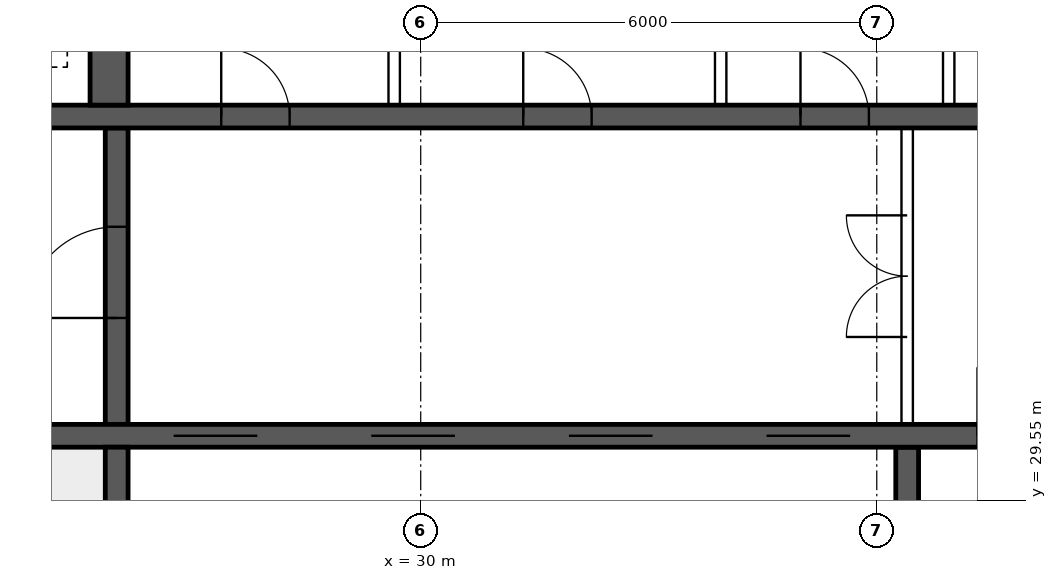
"""IFC4 building model, lengths in metres.
Left out: names, types, materials, properties, quantities, classifications, styles, units other than length and angle.
Written with IfcOpenShell. Run it as: python <this file> out.ifc"""

import sys

from ifc_helpers import new_model, si_unit, direction, frame, frame_2d, origin, place, context, subcontext, project, spatial, rectangle, extrude, element, fill, save


model = new_model("IFC4")
c1 = context("Model", 3, precision=1e-05, world=origin(), true_north=direction((0.0, 1.0)))
c2 = subcontext(c1, "Body", "Model", "MODEL_VIEW")
j1 = project(units=[si_unit("LENGTHUNIT", "METRE"), si_unit("PLANEANGLEUNIT", "RADIAN")], contexts=[c1])
p1 = place(None, origin())
s1 = spatial("IfcSite", under=j1, at=p1, CompositionType="ELEMENT")
p2 = place(p1, origin())
s2 = spatial("IfcBuilding", under=s1, at=p2, CompositionType="ELEMENT")
p3 = place(p2, frame((0.0, 0.0, 144.85)))
s3 = spatial("IfcBuildingStorey", under=s2, at=p3, CompositionType="ELEMENT", Elevation=144.85)
p4 = place(p3, frame((18.425, 30.4, 0.0), z_axis=(0.0, 0.0, 1.0), x_axis=(1.0, 0.0, 0.0)))
e1 = element("IfcWall", 1, at=p4, inside=s3, PredefinedType="SHEAR", context=c2, shape_type="SweptSolid", body=[
    extrude(rectangle(XDim=47.15, YDim=0.3, at=frame_2d((23.575, 0.0))), origin(), (0.0, 0.0, 1.0), 3.75),
])
p5 = place(p4, frame((0.4, 0.0, 0.0)))
e2 = element("IfcOpeningElement", 2, at=p5, cuts=e1, PredefinedType="OPENING", context=c2, shape_type="SweptSolid", body=[
    extrude(rectangle(XDim=1.0, YDim=2.1, at=frame_2d((0.5, 1.05))), frame((0.0, 0.16, 0.0), z_axis=(0.0, -1.0, 0.0), x_axis=(1.0, 0.0, 0.0)), (0.0, 0.0, 1.0), 0.32),
])
p6 = place(p4, frame((45.75, 0.0, 0.0)))
e3 = element("IfcOpeningElement", 3, at=p6, cuts=e1, PredefinedType="OPENING", context=c2, shape_type="SweptSolid", body=[
    extrude(rectangle(XDim=1.0, YDim=2.1, at=frame_2d((0.5, 1.05))), frame((0.0, 0.16, 0.0), z_axis=(0.0, -1.0, 0.0), x_axis=(1.0, 0.0, 0.0)), (0.0, 0.0, 1.0), 0.32),
])
p7 = place(p4, frame((8.325, 0.0, 0.0)))
e4 = element("IfcOpeningElement", 4, at=p7, cuts=e1, PredefinedType="OPENING", context=c2, shape_type="SweptSolid", body=[
    extrude(rectangle(XDim=1.1, YDim=2.1, at=frame_2d((0.55, 1.05))), frame((0.0, 0.16, 0.0), z_axis=(0.0, -1.0, 0.0), x_axis=(1.0, 0.0, 0.0)), (0.0, 0.0, 1.0), 0.32),
])
p8 = place(p4, frame((10.925, 0.0, 0.0)))
e5 = element("IfcOpeningElement", 5, at=p8, cuts=e1, PredefinedType="OPENING", context=c2, shape_type="SweptSolid", body=[
    extrude(rectangle(XDim=1.1, YDim=2.1, at=frame_2d((0.55, 1.05))), frame((0.0, 0.16, 0.0), z_axis=(0.0, -1.0, 0.0), x_axis=(1.0, 0.0, 0.0)), (0.0, 0.0, 1.0), 0.32),
])
p9 = place(p4, frame((13.525, 0.0, 0.0)))
e6 = element("IfcOpeningElement", 6, at=p9, cuts=e1, PredefinedType="OPENING", context=c2, shape_type="SweptSolid", body=[
    extrude(rectangle(XDim=1.1, YDim=2.1, at=frame_2d((0.55, 1.05))), frame((0.0, 0.16, 0.0), z_axis=(0.0, -1.0, 0.0), x_axis=(1.0, 0.0, 0.0)), (0.0, 0.0, 1.0), 0.32),
])
p10 = place(p4, frame((16.125, 0.0, 0.0)))
e7 = element("IfcOpeningElement", 7, at=p10, cuts=e1, PredefinedType="OPENING", context=c2, shape_type="SweptSolid", body=[
    extrude(rectangle(XDim=1.1, YDim=2.1, at=frame_2d((0.55, 1.05))), frame((0.0, 0.16, 0.0), z_axis=(0.0, -1.0, 0.0), x_axis=(1.0, 0.0, 0.0)), (0.0, 0.0, 1.0), 0.32),
])
p11 = place(p4, frame((18.9, 0.0, 0.0)))
e8 = element("IfcOpeningElement", 8, at=p11, cuts=e1, PredefinedType="OPENING", context=c2, shape_type="SweptSolid", body=[
    extrude(rectangle(XDim=0.9, YDim=2.1, at=frame_2d((0.45, 1.05))), frame((0.0, 0.16, 0.0), z_axis=(0.0, -1.0, 0.0), x_axis=(1.0, 0.0, 0.0)), (0.0, 0.0, 1.0), 0.32),
])
p12 = place(p4, frame((30.192, 0.0, 0.0)))
e9 = element("IfcOpeningElement", 9, at=p12, cuts=e1, PredefinedType="OPENING", context=c2, shape_type="SweptSolid", body=[
    extrude(rectangle(XDim=1.1, YDim=2.1, at=frame_2d((0.55, 1.05))), frame((0.0, 0.16, 0.0), z_axis=(0.0, -1.0, 0.0), x_axis=(1.0, 0.0, 0.0)), (0.0, 0.0, 1.0), 0.32),
])
p13 = place(p4, frame((33.725, 0.0, 0.0)))
e10 = element("IfcOpeningElement", 10, at=p13, cuts=e1, PredefinedType="OPENING", context=c2, shape_type="SweptSolid", body=[
    extrude(rectangle(XDim=1.1, YDim=2.1, at=frame_2d((0.55, 1.05))), frame((0.0, 0.16, 0.0), z_axis=(0.0, -1.0, 0.0), x_axis=(1.0, 0.0, 0.0)), (0.0, 0.0, 1.0), 0.32),
])
p14 = place(p4, frame((37.258, 0.0, 0.0)))
e11 = element("IfcOpeningElement", 11, at=p14, cuts=e1, PredefinedType="OPENING", context=c2, shape_type="SweptSolid", body=[
    extrude(rectangle(XDim=1.1, YDim=2.1, at=frame_2d((0.55, 1.05))), frame((0.0, 0.16, 0.0), z_axis=(0.0, -1.0, 0.0), x_axis=(1.0, 0.0, 0.0)), (0.0, 0.0, 1.0), 0.32),
])
p15 = place(p3, frame((18.425, 34.6, 0.0), z_axis=(0.0, 0.0, 1.0), x_axis=(1.0, 0.0, 0.0)))
e12 = element("IfcWall", 12, at=p15, inside=s3, PredefinedType="SHEAR", context=c2, shape_type="SweptSolid", body=[
    extrude(rectangle(XDim=47.15, YDim=0.3, at=frame_2d((23.575, 0.0))), origin(), (0.0, 0.0, 1.0), 3.75),
])
p16 = place(p15, frame((0.9, 0.0, 0.0)))
e13 = element("IfcOpeningElement", 13, at=p16, cuts=e12, PredefinedType="OPENING", context=c2, shape_type="SweptSolid", body=[
    extrude(rectangle(XDim=1.1, YDim=2.1, at=frame_2d((0.55, 1.05))), frame((0.0, 0.16, 0.0), z_axis=(0.0, -1.0, 0.0), x_axis=(1.0, 0.0, 0.0)), (0.0, 0.0, 1.0), 0.32),
])
p17 = place(p15, frame((45.15, 0.0, 0.0)))
e14 = element("IfcOpeningElement", 14, at=p17, cuts=e12, PredefinedType="OPENING", context=c2, shape_type="SweptSolid", body=[
    extrude(rectangle(XDim=1.1, YDim=2.1, at=frame_2d((0.55, 1.05))), frame((0.0, 0.16, 0.0), z_axis=(0.0, -1.0, 0.0), x_axis=(1.0, 0.0, 0.0)), (0.0, 0.0, 1.0), 0.32),
])
p18 = place(p15, frame((4.175, 0.0, 0.0)))
e15 = element("IfcOpeningElement", 15, at=p18, cuts=e12, PredefinedType="OPENING", context=c2, shape_type="SweptSolid", body=[
    extrude(rectangle(XDim=0.9, YDim=2.1, at=frame_2d((0.45, 1.05))), frame((0.0, 0.16, 0.0), z_axis=(0.0, -1.0, 0.0), x_axis=(1.0, 0.0, 0.0)), (0.0, 0.0, 1.0), 0.32),
])
p19 = place(p15, frame((42.075, 0.0, 0.0)))
e16 = element("IfcOpeningElement", 16, at=p19, cuts=e12, PredefinedType="OPENING", context=c2, shape_type="SweptSolid", body=[
    extrude(rectangle(XDim=0.9, YDim=2.1, at=frame_2d((0.45, 1.05))), frame((0.0, 0.16, 0.0), z_axis=(0.0, -1.0, 0.0), x_axis=(1.0, 0.0, 0.0)), (0.0, 0.0, 1.0), 0.32),
])
p20 = place(p15, frame((8.95, 0.0, 0.0)))
e17 = element("IfcOpeningElement", 17, at=p20, cuts=e12, PredefinedType="OPENING", context=c2, shape_type="SweptSolid", body=[
    extrude(rectangle(XDim=0.9, YDim=2.1, at=frame_2d((0.45, 1.05))), frame((0.0, 0.16, 0.0), z_axis=(0.0, -1.0, 0.0), x_axis=(1.0, 0.0, 0.0)), (0.0, 0.0, 1.0), 0.32),
])
p21 = place(p15, frame((12.924, 0.0, 0.0)))
e18 = element("IfcOpeningElement", 18, at=p21, cuts=e12, PredefinedType="OPENING", context=c2, shape_type="SweptSolid", body=[
    extrude(rectangle(XDim=0.9, YDim=2.1, at=frame_2d((0.45, 1.05))), frame((0.0, 0.16, 0.0), z_axis=(0.0, -1.0, 0.0), x_axis=(1.0, 0.0, 0.0)), (0.0, 0.0, 1.0), 0.32),
])
p22 = place(p15, frame((16.571, 0.0, 0.0)))
e19 = element("IfcOpeningElement", 19, at=p22, cuts=e12, PredefinedType="OPENING", context=c2, shape_type="SweptSolid", body=[
    extrude(rectangle(XDim=0.9, YDim=2.1, at=frame_2d((0.45, 1.05))), frame((0.0, 0.16, 0.0), z_axis=(0.0, -1.0, 0.0), x_axis=(1.0, 0.0, 0.0)), (0.0, 0.0, 1.0), 0.32),
])
p23 = place(p15, frame((20.33, 0.0, 0.0)))
e20 = element("IfcOpeningElement", 20, at=p23, cuts=e12, PredefinedType="OPENING", context=c2, shape_type="SweptSolid", body=[
    extrude(rectangle(XDim=0.9, YDim=2.1, at=frame_2d((0.45, 1.05))), frame((0.0, 0.16, 0.0), z_axis=(0.0, -1.0, 0.0), x_axis=(1.0, 0.0, 0.0)), (0.0, 0.0, 1.0), 0.32),
])
p24 = place(p15, frame((24.736, 0.0, 0.0)))
e21 = element("IfcOpeningElement", 21, at=p24, cuts=e12, PredefinedType="OPENING", context=c2, shape_type="SweptSolid", body=[
    extrude(rectangle(XDim=0.9, YDim=2.1, at=frame_2d((0.45, 1.05))), frame((0.0, 0.16, 0.0), z_axis=(0.0, -1.0, 0.0), x_axis=(1.0, 0.0, 0.0)), (0.0, 0.0, 1.0), 0.32),
])
p25 = place(p15, frame((27.533, 0.0, 0.0)))
e22 = element("IfcOpeningElement", 22, at=p25, cuts=e12, PredefinedType="OPENING", context=c2, shape_type="SweptSolid", body=[
    extrude(rectangle(XDim=0.9, YDim=2.1, at=frame_2d((0.45, 1.05))), frame((0.0, 0.16, 0.0), z_axis=(0.0, -1.0, 0.0), x_axis=(1.0, 0.0, 0.0)), (0.0, 0.0, 1.0), 0.32),
])
p26 = place(p15, frame((30.716, 0.0, 0.0)))
e23 = element("IfcOpeningElement", 23, at=p26, cuts=e12, PredefinedType="OPENING", context=c2, shape_type="SweptSolid", body=[
    extrude(rectangle(XDim=0.9, YDim=2.1, at=frame_2d((0.45, 1.05))), frame((0.0, 0.16, 0.0), z_axis=(0.0, -1.0, 0.0), x_axis=(1.0, 0.0, 0.0)), (0.0, 0.0, 1.0), 0.32),
])
p27 = place(p15, frame((34.667, 0.0, 0.0)))
e24 = element("IfcOpeningElement", 24, at=p27, cuts=e12, PredefinedType="OPENING", context=c2, shape_type="SweptSolid", body=[
    extrude(rectangle(XDim=0.9, YDim=2.1, at=frame_2d((0.45, 1.05))), frame((0.0, 0.16, 0.0), z_axis=(0.0, -1.0, 0.0), x_axis=(1.0, 0.0, 0.0)), (0.0, 0.0, 1.0), 0.32),
])
p28 = place(p15, frame((37.605, 0.0, 0.0)))
e25 = element("IfcOpeningElement", 25, at=p28, cuts=e12, PredefinedType="OPENING", context=c2, shape_type="SweptSolid", body=[
    extrude(rectangle(XDim=0.9, YDim=2.1, at=frame_2d((0.45, 1.05))), frame((0.0, 0.16, 0.0), z_axis=(0.0, -1.0, 0.0), x_axis=(1.0, 0.0, 0.0)), (0.0, 0.0, 1.0), 0.32),
])
p29 = place(p3, frame((26.0, 26.225, 0.0), z_axis=(0.0, 0.0, 1.0), x_axis=(0.0, 1.0, 0.0)))
e26 = element("IfcWall", 26, at=p29, inside=s3, PredefinedType="SHEAR", context=c2, shape_type="SweptSolid", body=[
    extrude(rectangle(XDim=4.025, YDim=0.3, at=frame_2d((2.012, 0.0))), origin(), (0.0, 0.0, 1.0), 3.75),
])
p30 = place(p3, frame((26.0, 30.55, 0.0), z_axis=(0.0, 0.0, 1.0), x_axis=(0.0, 1.0, 0.0)))
e27 = element("IfcWall", 27, at=p30, inside=s3, PredefinedType="SHEAR", context=c2, shape_type="SweptSolid", body=[
    extrude(rectangle(XDim=3.9, YDim=0.3, at=frame_2d((1.95, 0.0))), origin(), (0.0, 0.0, 1.0), 3.75),
])
p31 = place(p30, frame((1.4, 0.0, 0.0)))
e28 = element("IfcOpeningElement", 28, at=p31, cuts=e27, PredefinedType="OPENING", context=c2, shape_type="SweptSolid", body=[
    extrude(rectangle(XDim=1.2, YDim=2.1, at=frame_2d((0.6, 1.05))), frame((0.0, 0.16, 0.0), z_axis=(0.0, -1.0, 0.0), x_axis=(1.0, 0.0, 0.0)), (0.0, 0.0, 1.0), 0.32),
])
p32 = place(p3, frame((25.9, 34.75, 0.0), z_axis=(0.0, 0.0, 1.0), x_axis=(0.0, 1.0, 0.0)))
e29 = element("IfcWall", 29, at=p32, inside=s3, PredefinedType="SHEAR", context=c2, shape_type="SweptSolid", body=[
    extrude(rectangle(XDim=3.025, YDim=0.5, at=frame_2d((1.512, 0.0))), origin(), (0.0, 0.0, 1.0), 3.75),
])
p33 = place(p3, frame((36.4, 26.225, 0.0), z_axis=(0.0, 0.0, 1.0), x_axis=(0.0, 1.0, 0.0)))
e30 = element("IfcWall", 30, at=p33, inside=s3, PredefinedType="SHEAR", context=c2, shape_type="SweptSolid", body=[
    extrude(rectangle(XDim=4.025, YDim=0.3, at=frame_2d((2.012, 0.0))), origin(), (0.0, 0.0, 1.0), 3.75),
])
p34 = place(p3, frame((36.4, 30.55, 0.0), z_axis=(0.0, 0.0, 1.0), x_axis=(0.0, 1.0, 0.0)))
e31 = element("IfcWall", 31, at=p34, inside=s3, PredefinedType="SOLIDWALL", context=c2, shape_type="SweptSolid", body=[
    extrude(rectangle(XDim=3.9, YDim=0.15, at=frame_2d((1.95, 0.0))), origin(), (0.0, 0.0, 1.0), 3.3),
])
p35 = place(p34, frame((1.15, 0.0, 0.0)))
e32 = element("IfcOpeningElement", 32, at=p35, cuts=e31, PredefinedType="OPENING", context=c2, shape_type="SweptSolid", body=[
    extrude(rectangle(XDim=1.6, YDim=2.1, at=frame_2d((0.8, 1.05))), frame((0.0, 0.085, 0.0), z_axis=(0.0, -1.0, 0.0), x_axis=(1.0, 0.0, 0.0)), (0.0, 0.0, 1.0), 0.17),
])
for number, where, z_axis, x_axis in (
    (33, (29.651, 34.75, 0.0), (0.0, 0.0, 1.0), (0.0, 1.0, 0.0)),
    (34, (33.946, 34.75, 0.0), (0.0, 0.0, 1.0), (0.0, 1.0, 0.0)),
    (35, (36.946, 34.75, 0.0), (0.0, 0.0, 1.0), (0.0, 1.0, 0.0)),
):
    element("IfcWall", number, at=place(p3, frame(where, z_axis=z_axis, x_axis=x_axis)), inside=s3, PredefinedType="SOLIDWALL", context=c2, shape_type="SweptSolid", body=[
        extrude(rectangle(XDim=3.025, YDim=0.15, at=frame_2d((1.512, 0.0))), origin(), (0.0, 0.0, 1.0), 3.3),
    ])
p36 = place(p35, origin())
e36 = element("IfcDoor", 36, at=p36, inside=s3, OperationType="DOUBLE_DOOR_SINGLE_SWING", PredefinedType="DOOR", context=c2, shape_type="SweptSolid", body=[
    extrude(rectangle(XDim=1.6, YDim=2.1, at=frame_2d((0.8, 1.05))), frame((0.0, 0.025, 0.0), z_axis=(0.0, -1.0, 0.0), x_axis=(1.0, 0.0, 0.0)), (0.0, 0.0, 1.0), 0.05),
])
fill(e32, e36)
p37 = place(p31, origin())
e37 = element("IfcDoor", 37, at=p37, inside=s3, OperationType="SINGLE_SWING_LEFT", PredefinedType="DOOR", context=c2, shape_type="SweptSolid", body=[
    extrude(rectangle(XDim=1.2, YDim=2.1, at=frame_2d((0.6, 1.05))), frame((0.0, 0.025, 0.0), z_axis=(0.0, -1.0, 0.0), x_axis=(1.0, 0.0, 0.0)), (0.0, 0.0, 1.0), 0.05),
])
fill(e28, e37)
p38 = place(p20, origin())
e38 = element("IfcDoor", 38, at=p38, inside=s3, OperationType="SINGLE_SWING_LEFT", PredefinedType="DOOR", context=c2, shape_type="SweptSolid", body=[
    extrude(rectangle(XDim=0.9, YDim=2.1, at=frame_2d((0.45, 1.05))), frame((0.0, 0.025, 0.0), z_axis=(0.0, -1.0, 0.0), x_axis=(1.0, 0.0, 0.0)), (0.0, 0.0, 1.0), 0.05),
])
fill(e17, e38)
p39 = place(p21, origin())
e39 = element("IfcDoor", 39, at=p39, inside=s3, OperationType="SINGLE_SWING_LEFT", PredefinedType="DOOR", context=c2, shape_type="SweptSolid", body=[
    extrude(rectangle(XDim=0.9, YDim=2.1, at=frame_2d((0.45, 1.05))), frame((0.0, 0.025, 0.0), z_axis=(0.0, -1.0, 0.0), x_axis=(1.0, 0.0, 0.0)), (0.0, 0.0, 1.0), 0.05),
])
fill(e18, e39)
p40 = place(p22, origin())
e40 = element("IfcDoor", 40, at=p40, inside=s3, OperationType="SINGLE_SWING_LEFT", PredefinedType="DOOR", context=c2, shape_type="SweptSolid", body=[
    extrude(rectangle(XDim=0.9, YDim=2.1, at=frame_2d((0.45, 1.05))), frame((0.0, 0.025, 0.0), z_axis=(0.0, -1.0, 0.0), x_axis=(1.0, 0.0, 0.0)), (0.0, 0.0, 1.0), 0.05),
])
fill(e19, e40)
p41 = place(p7, origin())
e41 = element("IfcDoor", 41, at=p41, inside=s3, OperationType="DOUBLE_DOOR_SLIDING", PredefinedType="DOOR", context=c2, shape_type="SweptSolid", body=[
    extrude(rectangle(XDim=1.1, YDim=2.1, at=frame_2d((0.55, 1.05))), frame((0.0, 0.025, 0.0), z_axis=(0.0, -1.0, 0.0), x_axis=(1.0, 0.0, 0.0)), (0.0, 0.0, 1.0), 0.05),
])
fill(e4, e41)
p42 = place(p8, origin())
e42 = element("IfcDoor", 42, at=p42, inside=s3, OperationType="DOUBLE_DOOR_SLIDING", PredefinedType="DOOR", context=c2, shape_type="SweptSolid", body=[
    extrude(rectangle(XDim=1.1, YDim=2.1, at=frame_2d((0.55, 1.05))), frame((0.0, 0.025, 0.0), z_axis=(0.0, -1.0, 0.0), x_axis=(1.0, 0.0, 0.0)), (0.0, 0.0, 1.0), 0.05),
])
fill(e5, e42)
p43 = place(p9, origin())
e43 = element("IfcDoor", 43, at=p43, inside=s3, OperationType="DOUBLE_DOOR_SLIDING", PredefinedType="DOOR", context=c2, shape_type="SweptSolid", body=[
    extrude(rectangle(XDim=1.1, YDim=2.1, at=frame_2d((0.55, 1.05))), frame((0.0, 0.025, 0.0), z_axis=(0.0, -1.0, 0.0), x_axis=(1.0, 0.0, 0.0)), (0.0, 0.0, 1.0), 0.05),
])
fill(e6, e43)
p44 = place(p10, origin())
e44 = element("IfcDoor", 44, at=p44, inside=s3, OperationType="DOUBLE_DOOR_SLIDING", PredefinedType="DOOR", context=c2, shape_type="SweptSolid", body=[
    extrude(rectangle(XDim=1.1, YDim=2.1, at=frame_2d((0.55, 1.05))), frame((0.0, 0.025, 0.0), z_axis=(0.0, -1.0, 0.0), x_axis=(1.0, 0.0, 0.0)), (0.0, 0.0, 1.0), 0.05),
])
fill(e7, e44)
save(model, sys.argv[1])
